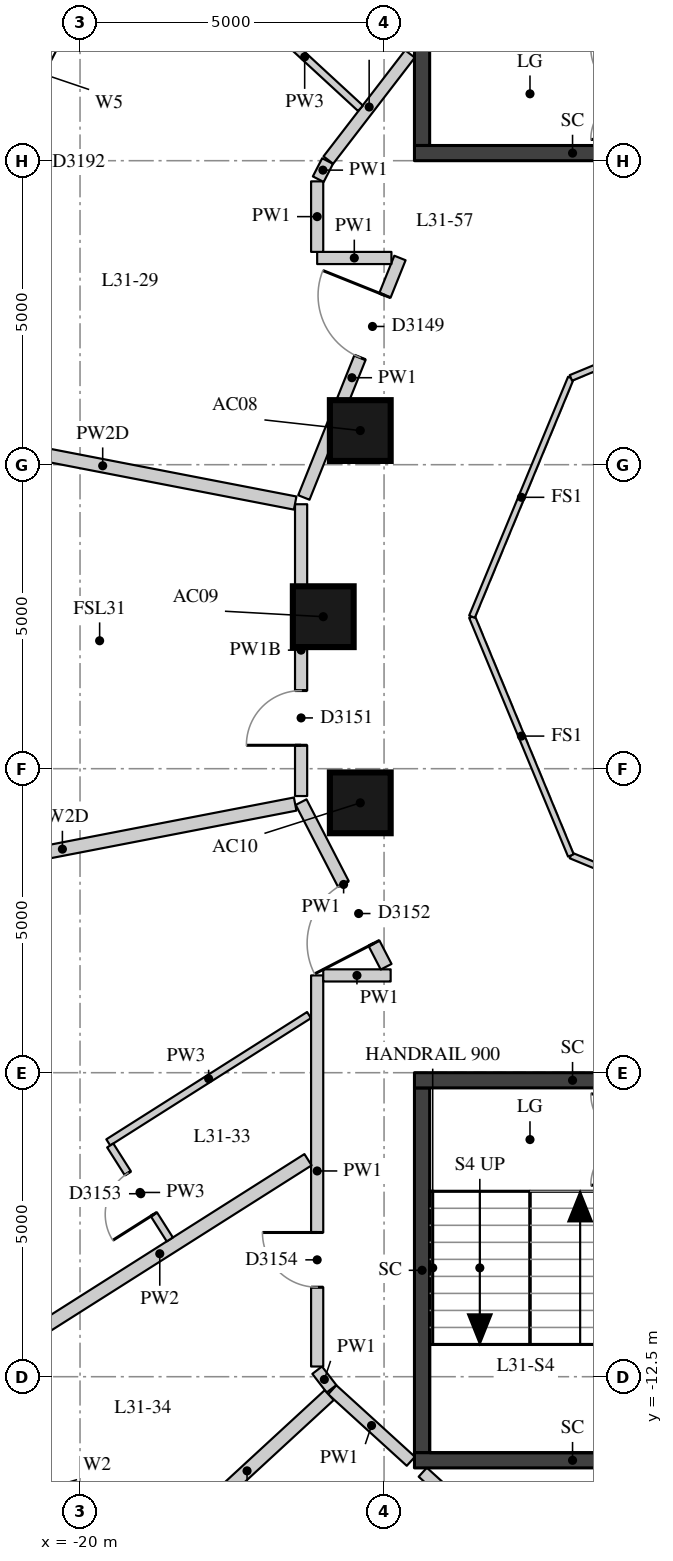
"""IFC4 building model, lengths in metres.
Left out: names, types, materials, properties, quantities, classifications, styles, units other than length and angle.
Written with IfcOpenShell. Run it as: python <this file> out.ifc"""

import sys

from ifc_helpers import new_model, si_unit, direction, frame, frame_2d, origin, origin_2d, place, context, subcontext, project, spatial, rectangle, extrude, element, fill, save


model = new_model("IFC4")
c1 = context("Model", 3, precision=1e-05, world=origin(), true_north=direction((0.0, 1.0)))
c2 = subcontext(c1, "Body", "Model", "MODEL_VIEW")
j1 = project(units=[si_unit("LENGTHUNIT", "METRE"), si_unit("PLANEANGLEUNIT", "RADIAN")], contexts=[c1])
p1 = place(None, origin())
s1 = spatial("IfcSite", under=j1, at=p1, CompositionType="ELEMENT")
p2 = place(p1, origin())
s2 = spatial("IfcBuilding", under=s1, at=p2, CompositionType="ELEMENT")
p3 = place(p2, frame((0.0, 0.0, 112.0)))
s3 = spatial("IfcBuildingStorey", under=s2, at=p3, CompositionType="ELEMENT", Elevation=112.0)
for number, where, z_axis, x_axis in (
    (1, (-15.391, 3.062, 0.0), (0.0, 0.0, 1.0), (1.0, 0.0, 0.0)),
    (2, (-16.0, 0.0, 0.0), (0.0, 0.0, 1.0), (1.0, 0.0, 0.0)),
    (3, (-15.391, -3.062, 0.0), (0.0, 0.0, 1.0), (1.0, 0.0, 0.0)),
):
    element("IfcColumn", number, at=place(p3, frame(where, z_axis=z_axis, x_axis=x_axis)), inside=s3, PredefinedType="COLUMN", context=c2, shape_type="SweptSolid", body=[
        extrude(rectangle(XDim=1.0, YDim=1.0, at=origin_2d()), origin(), (0.0, 0.0, 1.0), 3.3),
    ])
p4 = place(p3, frame((-21.908, -13.087, 0.0), z_axis=(0.0, 0.0, 1.0), x_axis=(0.610693945156, -0.791866721961, 0.0)))
e4 = element("IfcWall", 4, at=p4, inside=s3, PredefinedType="SOLIDWALL", context=c2, shape_type="SweptSolid", body=[
    extrude(rectangle(XDim=3.395, YDim=0.45, at=frame_2d((1.697, 0.0))), origin(), (0.0, 0.0, 1.0), 3.02),
])
p5 = place(p4, frame((0.697, 0.0, 0.4)))
e5 = element("IfcOpeningElement", 5, at=p5, cuts=e4, PredefinedType="OPENING", context=c2, shape_type="SweptSolid", body=[
    extrude(rectangle(XDim=2.0, YDim=1.75, at=frame_2d((1.0, 0.875))), frame((0.0, 0.235, 0.0), z_axis=(0.0, -1.0, 0.0), x_axis=(1.0, 0.0, 0.0)), (0.0, 0.0, 1.0), 0.47),
])
p6 = place(p3, frame((-20.182, 10.212, 0.0), z_axis=(0.0, 0.0, 1.0), x_axis=(-0.455932890657, -0.890014156751, 0.0)))
e6 = element("IfcWall", 6, at=p6, inside=s3, PredefinedType="SOLIDWALL", context=c2, shape_type="SweptSolid", body=[
    extrude(rectangle(XDim=3.888, YDim=0.45, at=frame_2d((1.944, 0.0))), origin(), (0.0, 0.0, 1.0), 3.02),
])
p7 = place(p6, frame((0.869, 0.0, 0.4)))
e7 = element("IfcOpeningElement", 7, at=p7, cuts=e6, PredefinedType="OPENING", context=c2, shape_type="SweptSolid", body=[
    extrude(rectangle(XDim=1.0, YDim=1.75, at=frame_2d((0.5, 0.875))), frame((0.0, 0.235, 0.0), z_axis=(0.0, -1.0, 0.0), x_axis=(1.0, 0.0, 0.0)), (0.0, 0.0, 1.0), 0.47),
])
p8 = place(p6, frame((2.019, 0.0, 0.0)))
e8 = element("IfcOpeningElement", 8, at=p8, cuts=e6, PredefinedType="OPENING", context=c2, shape_type="SweptSolid", body=[
    extrude(rectangle(XDim=1.0, YDim=2.15, at=frame_2d((0.5, 1.075))), frame((0.0, 0.235, 0.0), z_axis=(0.0, -1.0, 0.0), x_axis=(1.0, 0.0, 0.0)), (0.0, 0.0, 1.0), 0.47),
])
p9 = place(p3, frame((-14.375, 7.75, -0.28), z_axis=(0.0, 0.0, 1.0), x_axis=(0.0, 1.0, 0.0)))
e9 = element("IfcWall", 9, at=p9, inside=s3, PredefinedType="SHEAR", context=c2, shape_type="SweptSolid", body=[
    extrude(rectangle(XDim=6.0, YDim=0.25, at=frame_2d((3.0, 0.0))), origin(), (0.0, 0.0, 1.0), 3.3),
])
p10 = place(p3, frame((-14.5, 7.625, -0.28), z_axis=(0.0, 0.0, 1.0), x_axis=(1.0, 0.0, 0.0)))
e10 = element("IfcWall", 10, at=p10, inside=s3, PredefinedType="SHEAR", context=c2, shape_type="SweptSolid", body=[
    extrude(rectangle(XDim=5.2, YDim=0.25, at=frame_2d((2.6, 0.0))), origin(), (0.0, 0.0, 1.0), 3.3),
])
p11 = place(p3, frame((-14.375, -13.75, -0.28), z_axis=(0.0, 0.0, 1.0), x_axis=(0.0, 1.0, 0.0)))
e11 = element("IfcWall", 11, at=p11, inside=s3, PredefinedType="SHEAR", context=c2, shape_type="SweptSolid", body=[
    extrude(rectangle(XDim=6.0, YDim=0.25, at=frame_2d((3.0, 0.0))), origin(), (0.0, 0.0, 1.0), 3.3),
])
for number, where, z_axis, x_axis in (
    (12, (-14.5, -7.625, -0.28), (0.0, 0.0, 1.0), (1.0, 0.0, 0.0)),
    (13, (-14.5, -13.875, -0.28), (0.0, 0.0, 1.0), (1.0, 0.0, 0.0)),
):
    element("IfcWall", number, at=place(p3, frame(where, z_axis=z_axis, x_axis=x_axis)), inside=s3, PredefinedType="SHEAR", context=c2, shape_type="SweptSolid", body=[
        extrude(rectangle(XDim=5.2, YDim=0.25, at=frame_2d((2.6, 0.0))), origin(), (0.0, 0.0, 1.0), 3.3),
    ])
p12 = place(p3, frame((-14.56, -13.891, 0.0), z_axis=(0.0, 0.0, 1.0), x_axis=(-0.739440483737, 0.673221932954, 0.0)))
e14 = element("IfcWall", 14, at=p12, inside=s3, PredefinedType="PARTITIONING", context=c2, shape_type="SweptSolid", body=[
    extrude(rectangle(XDim=1.748, YDim=0.2, at=frame_2d((0.874, 0.0))), origin(), (0.0, 0.0, 1.0), 3.02),
])
p13 = place(p3, frame((-15.864, -12.699, 0.0), z_axis=(0.0, 0.0, 1.0), x_axis=(-0.61004607296, 0.792365943782, 0.0)))
e15 = element("IfcWall", 15, at=p13, inside=s3, PredefinedType="PARTITIONING", context=c2, shape_type="SweptSolid", body=[
    extrude(rectangle(XDim=0.387, YDim=0.2, at=frame_2d((0.193, 0.0))), origin(), (0.0, 0.0, 1.0), 3.02),
])
p14 = place(p3, frame((-16.1, -12.332, 0.0), z_axis=(0.0, 0.0, 1.0), x_axis=(0.0, 1.0, 0.0)))
e16 = element("IfcWall", 16, at=p14, inside=s3, PredefinedType="PARTITIONING", context=c2, shape_type="SweptSolid", body=[
    extrude(rectangle(XDim=6.432, YDim=0.2, at=frame_2d((3.216, 0.0))), origin(), (0.0, 0.0, 1.0), 3.02),
])
p15 = place(p14, frame((1.304, 0.0, 0.0)))
e17 = element("IfcOpeningElement", 17, at=p15, cuts=e16, PredefinedType="OPENING", context=c2, shape_type="SweptSolid", body=[
    extrude(rectangle(XDim=0.9, YDim=2.1, at=frame_2d((0.45, 1.05))), frame((0.0, 0.11, 0.0), z_axis=(0.0, -1.0, 0.0), x_axis=(1.0, 0.0, 0.0)), (0.0, 0.0, 1.0), 0.22),
])
p16 = place(p3, frame((-16.0, -5.9, 0.0), z_axis=(0.0, 0.0, 1.0), x_axis=(1.0, 0.0, 0.0)))
e18 = element("IfcWall", 18, at=p16, inside=s3, PredefinedType="PARTITIONING", context=c2, shape_type="SweptSolid", body=[
    extrude(rectangle(XDim=1.108, YDim=0.2, at=frame_2d((0.554, 0.0))), origin(), (0.0, 0.0, 1.0), 3.02),
])
p17 = place(p3, frame((-14.966, -5.757, 0.0), z_axis=(0.0, 0.0, 1.0), x_axis=(-0.458904116107, 0.888485797422, 0.0)))
e19 = element("IfcWall", 19, at=p17, inside=s3, PredefinedType="PARTITIONING", context=c2, shape_type="SweptSolid", body=[
    extrude(rectangle(XDim=3.047, YDim=0.2, at=frame_2d((1.524, 0.0))), origin(), (0.0, 0.0, 1.0), 3.02),
])
p18 = place(p17, frame((0.435, 0.0, 0.0)))
e20 = element("IfcOpeningElement", 20, at=p18, cuts=e19, PredefinedType="OPENING", context=c2, shape_type="SweptSolid", body=[
    extrude(rectangle(XDim=1.1, YDim=2.1, at=frame_2d((0.55, 1.05))), frame((0.0, 0.11, 0.0), z_axis=(0.0, -1.0, 0.0), x_axis=(1.0, 0.0, 0.0)), (0.0, 0.0, 1.0), 0.22),
])
p19 = place(p3, frame((-16.364, -2.95, 0.0), z_axis=(0.0, 0.0, 1.0), x_axis=(0.0, 1.0, 0.0)))
e21 = element("IfcWall", 21, at=p19, inside=s3, PredefinedType="PARTITIONING", context=c2, shape_type="SweptSolid", body=[
    extrude(rectangle(XDim=4.799, YDim=0.2, at=frame_2d((2.4, 0.0))), origin(), (0.0, 0.0, 1.0), 2.52),
])
p20 = place(p19, frame((0.835, 0.0, 0.0)))
e22 = element("IfcOpeningElement", 22, at=p20, cuts=e21, PredefinedType="OPENING", context=c2, shape_type="SweptSolid", body=[
    extrude(rectangle(XDim=0.9, YDim=2.1, at=frame_2d((0.45, 1.05))), frame((0.0, 0.11, 0.0), z_axis=(0.0, -1.0, 0.0), x_axis=(1.0, 0.0, 0.0)), (0.0, 0.0, 1.0), 0.22),
])
p21 = place(p3, frame((-16.319, 1.961, 0.0), z_axis=(0.0, 0.0, 1.0), x_axis=(0.372352515432, 0.928091377102, 0.0)))
e23 = element("IfcWall", 23, at=p21, inside=s3, PredefinedType="PARTITIONING", context=c2, shape_type="SweptSolid", body=[
    extrude(rectangle(XDim=4.244, YDim=0.2, at=frame_2d((2.122, 0.0))), origin(), (0.0, 0.0, 1.0), 3.02),
])
p22 = place(p21, frame((2.481, 0.0, 0.0)))
e24 = element("IfcOpeningElement", 24, at=p22, cuts=e23, PredefinedType="OPENING", context=c2, shape_type="SweptSolid", body=[
    extrude(rectangle(XDim=1.1, YDim=2.1, at=frame_2d((0.55, 1.05))), frame((0.0, 0.11, 0.0), z_axis=(0.0, -1.0, 0.0), x_axis=(1.0, 0.0, 0.0)), (0.0, 0.0, 1.0), 0.22),
])
p23 = place(p3, frame((-14.879, 5.9, 0.0), z_axis=(0.0, 0.0, 1.0), x_axis=(-1.0, 0.0, 0.0)))
e25 = element("IfcWall", 25, at=p23, inside=s3, PredefinedType="PARTITIONING", context=c2, shape_type="SweptSolid", body=[
    extrude(rectangle(XDim=1.221, YDim=0.2, at=frame_2d((0.611, 0.0))), origin(), (0.0, 0.0, 1.0), 3.02),
])
p24 = place(p3, frame((-16.1, 6.0, 0.0), z_axis=(0.0, 0.0, 1.0), x_axis=(0.0, 1.0, 0.0)))
e26 = element("IfcWall", 26, at=p24, inside=s3, PredefinedType="PARTITIONING", context=c2, shape_type="SweptSolid", body=[
    extrude(rectangle(XDim=1.16, YDim=0.2, at=frame_2d((0.58, 0.0))), origin(), (0.0, 0.0, 1.0), 3.02),
])
p25 = place(p3, frame((-16.082, 7.196, 0.0), z_axis=(0.0, 0.0, 1.0), x_axis=(0.456789128428, 0.889575006478, 0.0)))
e27 = element("IfcWall", 27, at=p25, inside=s3, PredefinedType="PARTITIONING", context=c2, shape_type="SweptSolid", body=[
    extrude(rectangle(XDim=0.336, YDim=0.2, at=frame_2d((0.168, 0.0))), origin(), (0.0, 0.0, 1.0), 3.02),
])
p26 = place(p3, frame((-15.917, 7.51, 0.0), z_axis=(0.0, 0.0, 1.0), x_axis=(0.609673267649, 0.792652828617, 0.0)))
e28 = element("IfcWall", 28, at=p26, inside=s3, PredefinedType="PARTITIONING", context=c2, shape_type="SweptSolid", body=[
    extrude(rectangle(XDim=2.203, YDim=0.2, at=frame_2d((1.102, 0.0))), origin(), (0.0, 0.0, 1.0), 3.02),
])
p27 = place(p3, frame((-13.24, -15.093, 0.0), z_axis=(0.0, 0.0, 1.0), x_axis=(-0.739438095557, 0.673224556028, 0.0)))
e29 = element("IfcWall", 29, at=p27, inside=s3, PredefinedType="PARTITIONING", context=c2, shape_type="SweptSolid", body=[
    extrude(rectangle(XDim=1.519, YDim=0.2, at=frame_2d((0.76, 0.0))), origin(), (0.0, 0.0, 1.0), 3.02),
])
p28 = place(p3, frame((-22.793, 3.095, 0.0), z_axis=(0.0, 0.0, 1.0), x_axis=(0.981772102901, -0.190061931918, 0.0)))
e30 = element("IfcWall", 30, at=p28, inside=s3, PredefinedType="PARTITIONING", context=c2, shape_type="SweptSolid", body=[
    extrude(rectangle(XDim=6.448, YDim=0.22, at=frame_2d((3.224, 0.0))), origin(), (0.0, 0.0, 1.0), 2.47),
])
p29 = place(p3, frame((-24.118, -4.564, 0.0), z_axis=(0.0, 0.0, 1.0), x_axis=(0.981765151757, 0.190097834799, 0.0)))
e31 = element("IfcWall", 31, at=p29, inside=s3, PredefinedType="PARTITIONING", context=c2, shape_type="SweptSolid", body=[
    extrude(rectangle(XDim=7.798, YDim=0.22, at=frame_2d((3.899, 0.0))), origin(), (0.0, 0.0, 1.0), 2.47),
])
p30 = place(p3, frame((-21.126, -12.023, 0.0), z_axis=(0.0, 0.0, 1.0), x_axis=(0.844499715613, 0.535556001114, 0.0)))
e32 = element("IfcWall", 32, at=p30, inside=s3, PredefinedType="PARTITIONING", context=c2, shape_type="SweptSolid", body=[
    extrude(rectangle(XDim=5.773, YDim=0.22, at=frame_2d((2.887, 0.0))), origin(), (0.0, 0.0, 1.0), 3.02),
])
p31 = place(p3, frame((-18.604, -15.294, 0.0), z_axis=(0.0, 0.0, 1.0), x_axis=(0.73529495628, 0.677747244383, 0.0)))
e33 = element("IfcWall", 33, at=p31, inside=s3, PredefinedType="PARTITIONING", context=c2, shape_type="SweptSolid", body=[
    extrude(rectangle(XDim=3.674, YDim=0.22, at=frame_2d((1.837, 0.0))), origin(), (0.0, 0.0, 1.0), 2.57),
])
p32 = place(p3, frame((-15.387, 8.362, 0.0), z_axis=(0.0, 0.0, 1.0), x_axis=(-0.735313004993, 0.677727662626, 0.0)))
e34 = element("IfcWall", 34, at=p32, inside=s3, PredefinedType="PARTITIONING", context=c2, shape_type="SweptSolid", body=[
    extrude(rectangle(XDim=2.497, YDim=0.12, at=frame_2d((1.249, 0.0))), origin(), (0.0, 0.0, 1.0), 3.02),
])
p33 = place(p3, frame((-16.234, -6.552, 0.0), z_axis=(0.0, 0.0, 1.0), x_axis=(-0.844514089089, -0.535533335406, 0.0)))
e35 = element("IfcWall", 35, at=p33, inside=s3, PredefinedType="PARTITIONING", context=c2, shape_type="SweptSolid", body=[
    extrude(rectangle(XDim=3.91, YDim=0.12, at=frame_2d((1.955, 0.0))), origin(), (0.0, 0.0, 1.0), 3.02),
])
p34 = place(p3, frame((-19.503, -8.697, 0.0), z_axis=(0.0, 0.0, 1.0), x_axis=(0.535467767516, -0.844555664211, 0.0)))
e36 = element("IfcWall", 36, at=p34, inside=s3, PredefinedType="PARTITIONING", context=c2, shape_type="SweptSolid", body=[
    extrude(rectangle(XDim=1.83, YDim=0.12, at=frame_2d((0.915, 0.0))), origin(), (0.0, 0.0, 1.0), 3.02),
])
p35 = place(p34, frame((0.54, 0.0, 0.0)))
e37 = element("IfcOpeningElement", 37, at=p35, cuts=e36, PredefinedType="OPENING", context=c2, shape_type="SweptSolid", body=[
    extrude(rectangle(XDim=0.8, YDim=2.1, at=frame_2d((0.4, 1.05))), frame((0.0, 0.07, 0.0), z_axis=(0.0, -1.0, 0.0), x_axis=(1.0, 0.0, 0.0)), (0.0, 0.0, 1.0), 0.14),
])
for number, where, z_axis, x_axis in (
    (38, (-8.0, -5.554, 0.0), (0.0, 0.0, 1.0), (-0.924, 0.383, 0.0)),
    (39, (-11.927, -3.927, 0.0), (0.0, 0.0, 1.0), (-0.383, 0.924, 0.0)),
    (40, (-13.554, 0.0, 0.0), (0.0, 0.0, 1.0), (0.383, 0.924, 0.0)),
    (41, (-11.927, 3.927, 0.0), (0.0, 0.0, 1.0), (0.924, 0.383, 0.0)),
):
    element("IfcWall", number, at=place(p3, frame(where, z_axis=z_axis, x_axis=x_axis)), inside=s3, PredefinedType="PARTITIONING", context=c2, shape_type="SweptSolid", body=[
        extrude(rectangle(XDim=4.251, YDim=0.1, at=frame_2d((2.125, 0.0))), origin(), (0.0, 0.0, 1.0), 3.02),
    ])
p36 = place(p5, origin())
e42 = element("IfcWindow", 42, at=p36, inside=s3, PartitioningType="SINGLE_PANEL", PredefinedType="WINDOW", context=c2, shape_type="SweptSolid", body=[
    extrude(rectangle(XDim=2.0, YDim=1.75, at=frame_2d((1.0, 0.875))), frame((0.0, 0.035, 0.0), z_axis=(0.0, -1.0, 0.0), x_axis=(1.0, 0.0, 0.0)), (0.0, 0.0, 1.0), 0.06),
])
fill(e5, e42)
p37 = place(p22, origin())
e43 = element("IfcDoor", 43, at=p37, inside=s3, OperationType="SINGLE_SWING_RIGHT", PredefinedType="DOOR", context=c2, shape_type="SweptSolid", body=[
    extrude(rectangle(XDim=1.1, YDim=2.1, at=frame_2d((0.55, 1.05))), frame((0.0, 0.025, 0.0), z_axis=(0.0, -1.0, 0.0), x_axis=(1.0, 0.0, 0.0)), (0.0, 0.0, 1.0), 0.05),
])
fill(e24, e43)
p38 = place(p20, origin())
e44 = element("IfcDoor", 44, at=p38, inside=s3, OperationType="SINGLE_SWING_LEFT", PredefinedType="DOOR", context=c2, shape_type="SweptSolid", body=[
    extrude(rectangle(XDim=0.9, YDim=2.1, at=frame_2d((0.45, 1.05))), frame((0.0, 0.025, 0.0), z_axis=(0.0, -1.0, 0.0), x_axis=(1.0, 0.0, 0.0)), (0.0, 0.0, 1.0), 0.05),
])
fill(e22, e44)
p39 = place(p18, origin())
e45 = element("IfcDoor", 45, at=p39, inside=s3, OperationType="SINGLE_SWING_LEFT", PredefinedType="DOOR", context=c2, shape_type="SweptSolid", body=[
    extrude(rectangle(XDim=1.1, YDim=2.1, at=frame_2d((0.55, 1.05))), frame((0.0, 0.025, 0.0), z_axis=(0.0, -1.0, 0.0), x_axis=(1.0, 0.0, 0.0)), (0.0, 0.0, 1.0), 0.05),
])
fill(e20, e45)
p40 = place(p35, origin())
e46 = element("IfcDoor", 46, at=p40, inside=s3, OperationType="SINGLE_SWING_LEFT", PredefinedType="DOOR", context=c2, shape_type="SweptSolid", body=[
    extrude(rectangle(XDim=0.8, YDim=2.1, at=frame_2d((0.4, 1.05))), frame((0.0, 0.025, 0.0), z_axis=(0.0, -1.0, 0.0), x_axis=(1.0, 0.0, 0.0)), (0.0, 0.0, 1.0), 0.05),
])
fill(e37, e46)
p41 = place(p15, origin())
e47 = element("IfcDoor", 47, at=p41, inside=s3, OperationType="SINGLE_SWING_RIGHT", PredefinedType="DOOR", context=c2, shape_type="SweptSolid", body=[
    extrude(rectangle(XDim=0.9, YDim=2.1, at=frame_2d((0.45, 1.05))), frame((0.0, 0.025, 0.0), z_axis=(0.0, -1.0, 0.0), x_axis=(1.0, 0.0, 0.0)), (0.0, 0.0, 1.0), 0.05),
])
fill(e17, e47)
save(model, sys.argv[1])
